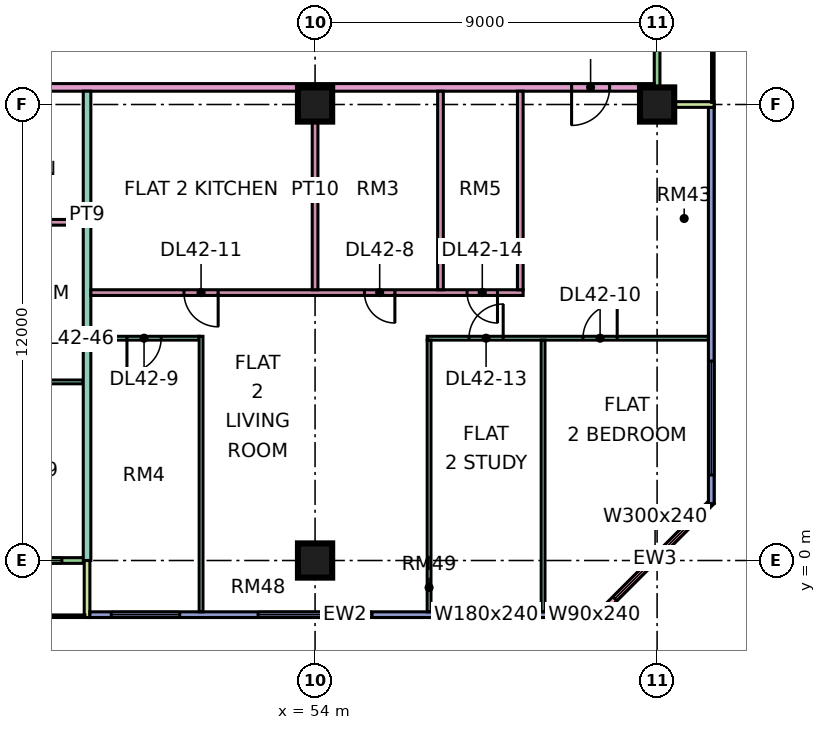
"""IFC4 building model, lengths in metres.
Left out: names, types, materials, properties, quantities, classifications, styles, units other than length and angle.
Written with IfcOpenShell. Run it as: python <this file> out.ifc"""

import sys

from ifc_helpers import new_model, si_unit, direction, frame, frame_2d, origin, origin_2d, place, context, subcontext, project, spatial, rectangle, extrude, element, fill, save


model = new_model("IFC4")
c1 = context("Model", 3, precision=1e-05, world=origin(), true_north=direction((0.0, 1.0)))
c2 = subcontext(c1, "Body", "Model", "MODEL_VIEW")
j1 = project(units=[si_unit("LENGTHUNIT", "METRE"), si_unit("PLANEANGLEUNIT", "RADIAN")], contexts=[c1])
p1 = place(None, origin())
s1 = spatial("IfcSite", under=j1, at=p1, CompositionType="ELEMENT")
p2 = place(p1, origin())
s2 = spatial("IfcBuilding", under=s1, at=p2, CompositionType="ELEMENT")
p3 = place(p2, frame((0.0, 0.0, 183.65)))
s3 = spatial("IfcBuildingStorey", under=s2, at=p3, CompositionType="ELEMENT", Elevation=183.65)
for number, where, z_axis, x_axis in (
    (1, (54.0, 0.0, 0.0), (0.0, 0.0, 1.0), (1.0, 0.0, 0.0)),
    (2, (54.0, 12.0, 0.0), (0.0, 0.0, 1.0), (1.0, 0.0, 0.0)),
    (3, (63.0, 12.0, 0.0), (0.0, 0.0, 1.0), (1.0, 0.0, 0.0)),
):
    element("IfcColumn", number, at=place(p3, frame(where, z_axis=z_axis, x_axis=x_axis)), inside=s3, PredefinedType="COLUMN", context=c2, shape_type="SweptSolid", body=[
        extrude(rectangle(XDim=0.9, YDim=0.9, at=origin_2d()), origin(), (0.0, 0.0, 1.0), 3.75),
    ])
p4 = place(p3, frame((36.075, 0.0, 0.0), z_axis=(0.0, 0.0, 1.0), x_axis=(1.0, 0.0, 0.0)))
e4 = element("IfcWall", 4, at=p4, inside=s3, PredefinedType="SOLIDWALL", context=c2, shape_type="SweptSolid", body=[
    extrude(rectangle(XDim=11.85, YDim=0.15, at=frame_2d((5.925, 0.0))), origin(), (0.0, 0.0, 1.0), 3.35),
])
p5 = place(p4, frame((2.3, 0.0, 0.0)))
e5 = element("IfcOpeningElement", 5, at=p5, cuts=e4, PredefinedType="OPENING", context=c2, shape_type="SweptSolid", body=[
    extrude(rectangle(XDim=1.8, YDim=2.4, at=frame_2d((0.9, 1.2))), frame((0.0, 0.085, 0.0), z_axis=(0.0, -1.0, 0.0), x_axis=(1.0, 0.0, 0.0)), (0.0, 0.0, 1.0), 0.17),
])
p6 = place(p4, frame((6.55, 0.0, 0.45)))
e6 = element("IfcOpeningElement", 6, at=p6, cuts=e4, PredefinedType="OPENING", context=c2, shape_type="SweptSolid", body=[
    extrude(rectangle(XDim=1.2, YDim=2.4, at=frame_2d((0.6, 1.2))), frame((0.0, 0.085, 0.0), z_axis=(0.0, -1.0, 0.0), x_axis=(1.0, 0.0, 0.0)), (0.0, 0.0, 1.0), 0.17),
])
p7 = place(p4, frame((10.062, 0.0, 0.45)))
e7 = element("IfcOpeningElement", 7, at=p7, cuts=e4, PredefinedType="OPENING", context=c2, shape_type="SweptSolid", body=[
    extrude(rectangle(XDim=1.2, YDim=2.4, at=frame_2d((0.6, 1.2))), frame((0.0, 0.085, 0.0), z_axis=(0.0, -1.0, 0.0), x_axis=(1.0, 0.0, 0.0)), (0.0, 0.0, 1.0), 0.17),
])
p8 = place(p3, frame((48.0, -1.5, 0.0), z_axis=(0.0, 0.0, 1.0), x_axis=(0.0, 1.0, 0.0)))
e8 = element("IfcWall", 8, at=p8, inside=s3, PredefinedType="SOLIDWALL", context=c2, shape_type="SweptSolid", body=[
    extrude(rectangle(XDim=1.5, YDim=0.15, at=frame_2d((0.75, 0.0))), origin(), (0.0, 0.0, 1.0), 3.35),
])
p9 = place(p3, frame((48.075, -1.425, 0.0), z_axis=(0.0, 0.0, 1.0), x_axis=(1.0, 0.0, 0.0)))
e9 = element("IfcWall", 9, at=p9, inside=s3, PredefinedType="SOLIDWALL", context=c2, shape_type="SweptSolid", body=[
    extrude(rectangle(XDim=13.425, YDim=0.15, at=frame_2d((6.712, 0.0))), origin(), (0.0, 0.0, 1.0), 3.35),
])
p10 = place(p9, frame((0.562, 0.0, 0.45)))
e10 = element("IfcOpeningElement", 10, at=p10, cuts=e9, PredefinedType="OPENING", context=c2, shape_type="SweptSolid", body=[
    extrude(rectangle(XDim=1.8, YDim=2.4, at=frame_2d((0.9, 1.2))), frame((0.0, 0.085, 0.0), z_axis=(0.0, -1.0, 0.0), x_axis=(1.0, 0.0, 0.0)), (0.0, 0.0, 1.0), 0.17),
])
p11 = place(p9, frame((4.425, 0.0, 0.45)))
e11 = element("IfcOpeningElement", 11, at=p11, cuts=e9, PredefinedType="OPENING", context=c2, shape_type="SweptSolid", body=[
    extrude(rectangle(XDim=3.0, YDim=2.4, at=frame_2d((1.5, 1.2))), frame((0.0, 0.085, 0.0), z_axis=(0.0, -1.0, 0.0), x_axis=(1.0, 0.0, 0.0)), (0.0, 0.0, 1.0), 0.17),
])
p12 = place(p9, frame((9.525, 0.0, 0.45)))
e12 = element("IfcOpeningElement", 12, at=p12, cuts=e9, PredefinedType="OPENING", context=c2, shape_type="SweptSolid", body=[
    extrude(rectangle(XDim=1.8, YDim=2.4, at=frame_2d((0.9, 1.2))), frame((0.0, 0.085, 0.0), z_axis=(0.0, -1.0, 0.0), x_axis=(1.0, 0.0, 0.0)), (0.0, 0.0, 1.0), 0.17),
])
p13 = place(p9, frame((12.225, 0.0, 0.45)))
e13 = element("IfcOpeningElement", 13, at=p13, cuts=e9, PredefinedType="OPENING", context=c2, shape_type="SweptSolid", body=[
    extrude(rectangle(XDim=0.9, YDim=2.4, at=frame_2d((0.45, 1.2))), frame((0.0, 0.085, 0.0), z_axis=(0.0, -1.0, 0.0), x_axis=(1.0, 0.0, 0.0)), (0.0, 0.0, 1.0), 0.17),
])
p14 = place(p3, frame((61.447, -1.447, 0.0), z_axis=(0.0, 0.0, 1.0), x_axis=(0.707106781187, 0.707106781187, 0.0)))
e14 = element("IfcWall", 14, at=p14, inside=s3, PredefinedType="SOLIDWALL", context=c2, shape_type="SweptSolid", body=[
    extrude(rectangle(XDim=4.243, YDim=0.15, at=frame_2d((2.121, 0.0))), origin(), (0.0, 0.0, 1.0), 3.35),
])
p15 = place(p14, frame((0.621, 0.0, 0.45)))
e15 = element("IfcOpeningElement", 15, at=p15, cuts=e14, PredefinedType="OPENING", context=c2, shape_type="SweptSolid", body=[
    extrude(rectangle(XDim=3.0, YDim=2.4, at=frame_2d((1.5, 1.2))), frame((0.0, 0.085, 0.0), z_axis=(0.0, -1.0, 0.0), x_axis=(1.0, 0.0, 0.0)), (0.0, 0.0, 1.0), 0.17),
])
p16 = place(p3, frame((64.425, 1.5, 0.0), z_axis=(0.0, 0.0, 1.0), x_axis=(0.0, 1.0, 0.0)))
e16 = element("IfcWall", 16, at=p16, inside=s3, PredefinedType="SOLIDWALL", context=c2, shape_type="SweptSolid", body=[
    extrude(rectangle(XDim=10.425, YDim=0.15, at=frame_2d((5.212, 0.0))), origin(), (0.0, 0.0, 1.0), 3.35),
])
p17 = place(p16, frame((0.75, 0.0, 0.45)))
e17 = element("IfcOpeningElement", 17, at=p17, cuts=e16, PredefinedType="OPENING", context=c2, shape_type="SweptSolid", body=[
    extrude(rectangle(XDim=3.0, YDim=2.4, at=frame_2d((1.5, 1.2))), frame((0.0, 0.085, 0.0), z_axis=(0.0, -1.0, 0.0), x_axis=(1.0, 0.0, 0.0)), (0.0, 0.0, 1.0), 0.17),
])
p18 = place(p3, frame((63.0, 12.075, 0.0), z_axis=(0.0, 0.0, 1.0), x_axis=(0.0, 1.0, 0.0)))
e18 = element("IfcWall", 18, at=p18, inside=s3, PredefinedType="SOLIDWALL", context=c2, shape_type="SweptSolid", body=[
    extrude(rectangle(XDim=10.35, YDim=0.15, at=frame_2d((5.175, 0.0))), origin(), (0.0, 0.0, 1.0), 3.35),
])
p19 = place(p18, frame((4.125, 0.0, 0.45)))
e19 = element("IfcOpeningElement", 19, at=p19, cuts=e18, PredefinedType="OPENING", context=c2, shape_type="SweptSolid", body=[
    extrude(rectangle(XDim=1.8, YDim=2.4, at=frame_2d((0.9, 1.2))), frame((0.0, 0.085, 0.0), z_axis=(0.0, -1.0, 0.0), x_axis=(1.0, 0.0, 0.0)), (0.0, 0.0, 1.0), 0.17),
])
p20 = place(p18, frame((7.538, 0.0, 0.0)))
e20 = element("IfcOpeningElement", 20, at=p20, cuts=e18, PredefinedType="OPENING", context=c2, shape_type="SweptSolid", body=[
    extrude(rectangle(XDim=1.8, YDim=2.4, at=frame_2d((0.9, 1.2))), frame((0.0, 0.085, 0.0), z_axis=(0.0, -1.0, 0.0), x_axis=(1.0, 0.0, 0.0)), (0.0, 0.0, 1.0), 0.17),
])
p21 = place(p3, frame((64.5, 12.0, 0.0), z_axis=(0.0, 0.0, 1.0), x_axis=(-1.0, 0.0, 0.0)))
e21 = element("IfcWall", 21, at=p21, inside=s3, PredefinedType="SOLIDWALL", context=c2, shape_type="SweptSolid", body=[
    extrude(rectangle(XDim=1.5, YDim=0.15, at=frame_2d((0.75, 0.0))), origin(), (0.0, 0.0, 1.0), 3.35),
])
p22 = place(p3, frame((33.05, 4.7, 0.0), z_axis=(0.0, 0.0, 1.0), x_axis=(1.0, 0.0, 0.0)))
e22 = element("IfcWall", 22, at=p22, inside=s3, PredefinedType="PARTITIONING", context=c2, shape_type="SweptSolid", body=[
    extrude(rectangle(XDim=14.85, YDim=0.1, at=frame_2d((7.425, 0.0))), origin(), (0.0, 0.0, 1.0), 3.35),
])
p23 = place(p22, frame((10.0, 0.0, 0.0)))
e23 = element("IfcOpeningElement", 23, at=p23, cuts=e22, PredefinedType="OPENING", context=c2, shape_type="SweptSolid", body=[
    extrude(rectangle(XDim=0.9, YDim=2.1, at=frame_2d((0.45, 1.05))), frame((0.0, 0.06, 0.0), z_axis=(0.0, -1.0, 0.0), x_axis=(1.0, 0.0, 0.0)), (0.0, 0.0, 1.0), 0.12),
])
p24 = place(p22, frame((13.0, 0.0, 0.0)))
e24 = element("IfcOpeningElement", 24, at=p24, cuts=e22, PredefinedType="OPENING", context=c2, shape_type="SweptSolid", body=[
    extrude(rectangle(XDim=0.9, YDim=2.1, at=frame_2d((0.45, 1.05))), frame((0.0, 0.06, 0.0), z_axis=(0.0, -1.0, 0.0), x_axis=(1.0, 0.0, 0.0)), (0.0, 0.0, 1.0), 0.12),
])
p25 = place(p22, frame((4.0, 0.0, 0.0)))
e25 = element("IfcOpeningElement", 25, at=p25, cuts=e22, PredefinedType="OPENING", context=c2, shape_type="SweptSolid", body=[
    extrude(rectangle(XDim=0.9, YDim=2.1, at=frame_2d((0.45, 1.05))), frame((0.0, 0.06, 0.0), z_axis=(0.0, -1.0, 0.0), x_axis=(1.0, 0.0, 0.0)), (0.0, 0.0, 1.0), 0.12),
])
p26 = place(p3, frame((40.65, 12.45, 0.0), z_axis=(0.0, 0.0, 1.0), x_axis=(1.0, 0.0, 0.0)))
e26 = element("IfcWall", 26, at=p26, inside=s3, PredefinedType="PARTITIONING", context=c2, shape_type="SweptSolid", body=[
    extrude(rectangle(XDim=22.276, YDim=0.2, at=frame_2d((11.138, 0.0))), origin(), (0.0, 0.0, 1.0), 3.35),
])
p27 = place(p26, frame((20.1, 0.0, 0.0)))
e27 = element("IfcOpeningElement", 27, at=p27, cuts=e26, PredefinedType="OPENING", context=c2, shape_type="SweptSolid", body=[
    extrude(rectangle(XDim=1.0, YDim=2.1, at=frame_2d((0.5, 1.05))), frame((0.0, 0.11, 0.0), z_axis=(0.0, -1.0, 0.0), x_axis=(1.0, 0.0, 0.0)), (0.0, 0.0, 1.0), 0.22),
])
p28 = place(p26, frame((1.05, 0.0, 0.0)))
e28 = element("IfcOpeningElement", 28, at=p28, cuts=e26, PredefinedType="OPENING", context=c2, shape_type="SweptSolid", body=[
    extrude(rectangle(XDim=1.0, YDim=2.1, at=frame_2d((0.5, 1.05))), frame((0.0, 0.11, 0.0), z_axis=(0.0, -1.0, 0.0), x_axis=(1.0, 0.0, 0.0)), (0.0, 0.0, 1.0), 0.22),
])
p29 = place(p3, frame((43.725, 5.9, 0.0), z_axis=(0.0, 0.0, 1.0), x_axis=(1.0, 0.0, 0.0)))
e29 = element("IfcWall", 29, at=p29, inside=s3, PredefinedType="PARTITIONING", context=c2, shape_type="SweptSolid", body=[
    extrude(rectangle(XDim=4.175, YDim=0.15, at=frame_2d((2.087, 0.0))), origin(), (0.0, 0.0, 1.0), 3.35),
])
p30 = place(p29, frame((1.675, 0.0, 0.0)))
e30 = element("IfcOpeningElement", 30, at=p30, cuts=e29, PredefinedType="OPENING", context=c2, shape_type="SweptSolid", body=[
    extrude(rectangle(XDim=0.8, YDim=2.1, at=frame_2d((0.4, 1.05))), frame((0.0, 0.085, 0.0), z_axis=(0.0, -1.0, 0.0), x_axis=(1.0, 0.0, 0.0)), (0.0, 0.0, 1.0), 0.17),
])
p31 = place(p3, frame((43.725, 8.9, 0.0), z_axis=(0.0, 0.0, 1.0), x_axis=(1.0, 0.0, 0.0)))
e31 = element("IfcWall", 31, at=p31, inside=s3, PredefinedType="PARTITIONING", context=c2, shape_type="SweptSolid", body=[
    extrude(rectangle(XDim=4.175, YDim=0.15, at=frame_2d((2.087, 0.0))), origin(), (0.0, 0.0, 1.0), 3.35),
])
p32 = place(p3, frame((48.0, 0.0, 0.0), z_axis=(0.0, 0.0, 1.0), x_axis=(0.0, 1.0, 0.0)))
e32 = element("IfcWall", 32, at=p32, inside=s3, PredefinedType="PARTITIONING", context=c2, shape_type="SweptSolid", body=[
    extrude(rectangle(XDim=5.9, YDim=0.2, at=frame_2d((2.95, 0.0))), origin(), (0.0, 0.0, 1.0), 3.35),
])
p33 = place(p3, frame((48.0, 5.825, 0.0), z_axis=(0.0, 0.0, 1.0), x_axis=(0.0, 1.0, 0.0)))
e33 = element("IfcWall", 33, at=p33, inside=s3, PredefinedType="PARTITIONING", context=c2, shape_type="SweptSolid", body=[
    extrude(rectangle(XDim=6.525, YDim=0.2, at=frame_2d((3.263, 0.0))), origin(), (0.0, 0.0, 1.0), 3.35),
])
p34 = place(p3, frame((48.1, 5.85, 0.0), z_axis=(0.0, 0.0, 1.0), x_axis=(1.0, 0.0, 0.0)))
e34 = element("IfcWall", 34, at=p34, inside=s3, PredefinedType="PARTITIONING", context=c2, shape_type="SweptSolid", body=[
    extrude(rectangle(XDim=2.85, YDim=0.1, at=frame_2d((1.425, 0.0))), origin(), (0.0, 0.0, 1.0), 3.35),
])
p35 = place(p34, frame((0.95, 0.0, 0.0)))
e35 = element("IfcOpeningElement", 35, at=p35, cuts=e34, PredefinedType="OPENING", context=c2, shape_type="SweptSolid", body=[
    extrude(rectangle(XDim=0.9, YDim=2.1, at=frame_2d((0.45, 1.05))), frame((0.0, 0.06, 0.0), z_axis=(0.0, -1.0, 0.0), x_axis=(1.0, 0.0, 0.0)), (0.0, 0.0, 1.0), 0.12),
])
p36 = place(p3, frame((48.1, 7.05, 0.0), z_axis=(0.0, 0.0, 1.0), x_axis=(1.0, 0.0, 0.0)))
e36 = element("IfcWall", 36, at=p36, inside=s3, PredefinedType="PARTITIONING", context=c2, shape_type="SweptSolid", body=[
    extrude(rectangle(XDim=11.375, YDim=0.15, at=frame_2d((5.688, 0.0))), origin(), (0.0, 0.0, 1.0), 3.35),
])
p37 = place(p36, frame((7.2, 0.0, 0.0)))
e37 = element("IfcOpeningElement", 37, at=p37, cuts=e36, PredefinedType="OPENING", context=c2, shape_type="SweptSolid", body=[
    extrude(rectangle(XDim=0.8, YDim=2.1, at=frame_2d((0.4, 1.05))), frame((0.0, 0.085, 0.0), z_axis=(0.0, -1.0, 0.0), x_axis=(1.0, 0.0, 0.0)), (0.0, 0.0, 1.0), 0.17),
])
p38 = place(p36, frame((2.45, 0.0, 0.0)))
e38 = element("IfcOpeningElement", 38, at=p38, cuts=e36, PredefinedType="OPENING", context=c2, shape_type="SweptSolid", body=[
    extrude(rectangle(XDim=0.9, YDim=2.1, at=frame_2d((0.45, 1.05))), frame((0.0, 0.085, 0.0), z_axis=(0.0, -1.0, 0.0), x_axis=(1.0, 0.0, 0.0)), (0.0, 0.0, 1.0), 0.17),
])
p39 = place(p36, frame((9.9, 0.0, 0.0)))
e39 = element("IfcOpeningElement", 39, at=p39, cuts=e36, PredefinedType="OPENING", context=c2, shape_type="SweptSolid", body=[
    extrude(rectangle(XDim=0.8, YDim=2.1, at=frame_2d((0.4, 1.05))), frame((0.0, 0.085, 0.0), z_axis=(0.0, -1.0, 0.0), x_axis=(1.0, 0.0, 0.0)), (0.0, 0.0, 1.0), 0.17),
])
p40 = place(p3, frame((51.0, -1.35, 0.0), z_axis=(0.0, 0.0, 1.0), x_axis=(0.0, 1.0, 0.0)))
e40 = element("IfcWall", 40, at=p40, inside=s3, PredefinedType="PARTITIONING", context=c2, shape_type="SweptSolid", body=[
    extrude(rectangle(XDim=7.25, YDim=0.1, at=frame_2d((3.625, 0.0))), origin(), (0.0, 0.0, 1.0), 3.35),
])
p41 = place(p3, frame((54.0, 7.125, 0.0), z_axis=(0.0, 0.0, 1.0), x_axis=(0.0, 1.0, 0.0)))
e41 = element("IfcWall", 41, at=p41, inside=s3, PredefinedType="PARTITIONING", context=c2, shape_type="SweptSolid", body=[
    extrude(rectangle(XDim=5.225, YDim=0.15, at=frame_2d((2.613, 0.0))), origin(), (0.0, 0.0, 1.0), 3.35),
])
p42 = place(p3, frame((56.95, 5.85, 0.0), z_axis=(0.0, 0.0, 1.0), x_axis=(1.0, 0.0, 0.0)))
e42 = element("IfcWall", 42, at=p42, inside=s3, PredefinedType="PARTITIONING", context=c2, shape_type="SweptSolid", body=[
    extrude(rectangle(XDim=7.4, YDim=0.1, at=frame_2d((3.7, 0.0))), origin(), (0.0, 0.0, 1.0), 3.35),
])
p43 = place(p42, frame((4.1, 0.0, 0.0)))
e43 = element("IfcOpeningElement", 43, at=p43, cuts=e42, PredefinedType="OPENING", context=c2, shape_type="SweptSolid", body=[
    extrude(rectangle(XDim=0.9, YDim=2.1, at=frame_2d((0.45, 1.05))), frame((0.0, 0.06, 0.0), z_axis=(0.0, -1.0, 0.0), x_axis=(1.0, 0.0, 0.0)), (0.0, 0.0, 1.0), 0.12),
])
p44 = place(p42, frame((1.1, 0.0, 0.0)))
e44 = element("IfcOpeningElement", 44, at=p44, cuts=e42, PredefinedType="OPENING", context=c2, shape_type="SweptSolid", body=[
    extrude(rectangle(XDim=0.9, YDim=2.1, at=frame_2d((0.45, 1.05))), frame((0.0, 0.06, 0.0), z_axis=(0.0, -1.0, 0.0), x_axis=(1.0, 0.0, 0.0)), (0.0, 0.0, 1.0), 0.12),
])
p45 = place(p3, frame((57.0, -1.35, 0.0), z_axis=(0.0, 0.0, 1.0), x_axis=(0.0, 1.0, 0.0)))
e45 = element("IfcWall", 45, at=p45, inside=s3, PredefinedType="PARTITIONING", context=c2, shape_type="SweptSolid", body=[
    extrude(rectangle(XDim=7.15, YDim=0.1, at=frame_2d((3.575, 0.0))), origin(), (0.0, 0.0, 1.0), 3.35),
])
for number, where, z_axis, x_axis in (
    (46, (57.3, 7.125, 0.0), (0.0, 0.0, 1.0), (0.0, 1.0, 0.0)),
    (47, (59.4, 7.125, 0.0), (0.0, 0.0, 1.0), (0.0, 1.0, 0.0)),
):
    element("IfcWall", number, at=place(p3, frame(where, z_axis=z_axis, x_axis=x_axis)), inside=s3, PredefinedType="PARTITIONING", context=c2, shape_type="SweptSolid", body=[
        extrude(rectangle(XDim=5.225, YDim=0.15, at=frame_2d((2.613, 0.0))), origin(), (0.0, 0.0, 1.0), 3.35),
    ])
p46 = place(p3, frame((60.0, -1.35, 0.0), z_axis=(0.0, 0.0, 1.0), x_axis=(0.0, 1.0, 0.0)))
e48 = element("IfcWall", 48, at=p46, inside=s3, PredefinedType="PARTITIONING", context=c2, shape_type="SweptSolid", body=[
    extrude(rectangle(XDim=7.15, YDim=0.1, at=frame_2d((3.575, 0.0))), origin(), (0.0, 0.0, 1.0), 3.35),
])
p47 = place(p7, origin())
e49 = element("IfcWindow", 49, at=p47, inside=s3, PartitioningType="SINGLE_PANEL", PredefinedType="WINDOW", context=c2, shape_type="SweptSolid", body=[
    extrude(rectangle(XDim=1.2, YDim=2.4, at=frame_2d((0.6, 1.2))), frame((0.0, 0.03, 0.0), z_axis=(0.0, -1.0, 0.0), x_axis=(1.0, 0.0, 0.0)), (0.0, 0.0, 1.0), 0.06),
])
fill(e7, e49)
p48 = place(p10, origin())
e50 = element("IfcWindow", 50, at=p48, inside=s3, PartitioningType="SINGLE_PANEL", PredefinedType="WINDOW", context=c2, shape_type="SweptSolid", body=[
    extrude(rectangle(XDim=1.8, YDim=2.4, at=frame_2d((0.9, 1.2))), frame((0.0, 0.03, 0.0), z_axis=(0.0, -1.0, 0.0), x_axis=(1.0, 0.0, 0.0)), (0.0, 0.0, 1.0), 0.06),
])
fill(e10, e50)
p49 = place(p11, origin())
e51 = element("IfcWindow", 51, at=p49, inside=s3, PartitioningType="SINGLE_PANEL", PredefinedType="WINDOW", context=c2, shape_type="SweptSolid", body=[
    extrude(rectangle(XDim=3.0, YDim=2.4, at=frame_2d((1.5, 1.2))), frame((0.0, 0.03, 0.0), z_axis=(0.0, -1.0, 0.0), x_axis=(1.0, 0.0, 0.0)), (0.0, 0.0, 1.0), 0.06),
])
fill(e11, e51)
p50 = place(p12, origin())
e52 = element("IfcWindow", 52, at=p50, inside=s3, PartitioningType="SINGLE_PANEL", PredefinedType="WINDOW", context=c2, shape_type="SweptSolid", body=[
    extrude(rectangle(XDim=1.8, YDim=2.4, at=frame_2d((0.9, 1.2))), frame((0.0, 0.03, 0.0), z_axis=(0.0, -1.0, 0.0), x_axis=(1.0, 0.0, 0.0)), (0.0, 0.0, 1.0), 0.06),
])
fill(e12, e52)
p51 = place(p13, origin())
e53 = element("IfcWindow", 53, at=p51, inside=s3, PartitioningType="SINGLE_PANEL", PredefinedType="WINDOW", context=c2, shape_type="SweptSolid", body=[
    extrude(rectangle(XDim=0.9, YDim=2.4, at=frame_2d((0.45, 1.2))), frame((0.0, 0.03, 0.0), z_axis=(0.0, -1.0, 0.0), x_axis=(1.0, 0.0, 0.0)), (0.0, 0.0, 1.0), 0.06),
])
fill(e13, e53)
p52 = place(p15, origin())
e54 = element("IfcWindow", 54, at=p52, inside=s3, PartitioningType="SINGLE_PANEL", PredefinedType="WINDOW", context=c2, shape_type="SweptSolid", body=[
    extrude(rectangle(XDim=3.0, YDim=2.4, at=frame_2d((1.5, 1.2))), frame((0.0, 0.03, 0.0), z_axis=(0.0, -1.0, 0.0), x_axis=(1.0, 0.0, 0.0)), (0.0, 0.0, 1.0), 0.06),
])
fill(e15, e54)
p53 = place(p17, origin())
e55 = element("IfcWindow", 55, at=p53, inside=s3, PartitioningType="SINGLE_PANEL", PredefinedType="WINDOW", context=c2, shape_type="SweptSolid", body=[
    extrude(rectangle(XDim=3.0, YDim=2.4, at=frame_2d((1.5, 1.2))), frame((0.0, 0.03, 0.0), z_axis=(0.0, -1.0, 0.0), x_axis=(1.0, 0.0, 0.0)), (0.0, 0.0, 1.0), 0.06),
])
fill(e17, e55)
p54 = place(p37, origin())
e56 = element("IfcDoor", 56, at=p54, inside=s3, OperationType="SINGLE_SWING_RIGHT", PredefinedType="DOOR", context=c2, shape_type="SweptSolid", body=[
    extrude(rectangle(XDim=0.8, YDim=2.1, at=frame_2d((0.4, 1.05))), frame((0.0, 0.025, 0.0), z_axis=(0.0, -1.0, 0.0), x_axis=(1.0, 0.0, 0.0)), (0.0, 0.0, 1.0), 0.05),
])
fill(e37, e56)
p55 = place(p35, frame((0.9, 0.0, 0.0), z_axis=(0.0, 0.0, 1.0), x_axis=(-1.0, 0.0, 0.0)))
e57 = element("IfcDoor", 57, at=p55, inside=s3, OperationType="SINGLE_SWING_LEFT", PredefinedType="DOOR", context=c2, shape_type="SweptSolid", body=[
    extrude(rectangle(XDim=0.9, YDim=2.1, at=frame_2d((0.45, 1.05))), frame((0.0, 0.025, 0.0), z_axis=(0.0, -1.0, 0.0), x_axis=(1.0, 0.0, 0.0)), (0.0, 0.0, 1.0), 0.05),
])
fill(e35, e57)
p56 = place(p43, frame((0.9, 0.0, 0.0), z_axis=(0.0, 0.0, 1.0), x_axis=(-1.0, 0.0, 0.0)))
e58 = element("IfcDoor", 58, at=p56, inside=s3, OperationType="SINGLE_SWING_RIGHT", PredefinedType="DOOR", context=c2, shape_type="SweptSolid", body=[
    extrude(rectangle(XDim=0.9, YDim=2.1, at=frame_2d((0.45, 1.05))), frame((0.0, 0.025, 0.0), z_axis=(0.0, -1.0, 0.0), x_axis=(1.0, 0.0, 0.0)), (0.0, 0.0, 1.0), 0.05),
])
fill(e43, e58)
p57 = place(p38, origin())
e59 = element("IfcDoor", 59, at=p57, inside=s3, OperationType="SINGLE_SWING_RIGHT", PredefinedType="DOOR", context=c2, shape_type="SweptSolid", body=[
    extrude(rectangle(XDim=0.9, YDim=2.1, at=frame_2d((0.45, 1.05))), frame((0.0, 0.025, 0.0), z_axis=(0.0, -1.0, 0.0), x_axis=(1.0, 0.0, 0.0)), (0.0, 0.0, 1.0), 0.05),
])
fill(e38, e59)
p58 = place(p27, frame((1.0, 0.0, 0.0), z_axis=(0.0, 0.0, 1.0), x_axis=(-1.0, 0.0, 0.0)))
e60 = element("IfcDoor", 60, at=p58, inside=s3, OperationType="SINGLE_SWING_LEFT", PredefinedType="DOOR", context=c2, shape_type="SweptSolid", body=[
    extrude(rectangle(XDim=1.0, YDim=2.1, at=frame_2d((0.5, 1.05))), frame((0.0, 0.025, 0.0), z_axis=(0.0, -1.0, 0.0), x_axis=(1.0, 0.0, 0.0)), (0.0, 0.0, 1.0), 0.05),
])
fill(e27, e60)
p59 = place(p44, frame((0.9, 0.0, 0.0), z_axis=(0.0, 0.0, 1.0), x_axis=(-1.0, 0.0, 0.0)))
e61 = element("IfcDoor", 61, at=p59, inside=s3, OperationType="SINGLE_SWING_RIGHT", PredefinedType="DOOR", context=c2, shape_type="SweptSolid", body=[
    extrude(rectangle(XDim=0.9, YDim=2.1, at=frame_2d((0.45, 1.05))), frame((0.0, 0.025, 0.0), z_axis=(0.0, -1.0, 0.0), x_axis=(1.0, 0.0, 0.0)), (0.0, 0.0, 1.0), 0.05),
])
fill(e44, e61)
p60 = place(p39, origin())
e62 = element("IfcDoor", 62, at=p60, inside=s3, OperationType="SINGLE_SWING_RIGHT", PredefinedType="DOOR", context=c2, shape_type="SweptSolid", body=[
    extrude(rectangle(XDim=0.8, YDim=2.1, at=frame_2d((0.4, 1.05))), frame((0.0, 0.025, 0.0), z_axis=(0.0, -1.0, 0.0), x_axis=(1.0, 0.0, 0.0)), (0.0, 0.0, 1.0), 0.05),
])
fill(e39, e62)
save(model, sys.argv[1])
